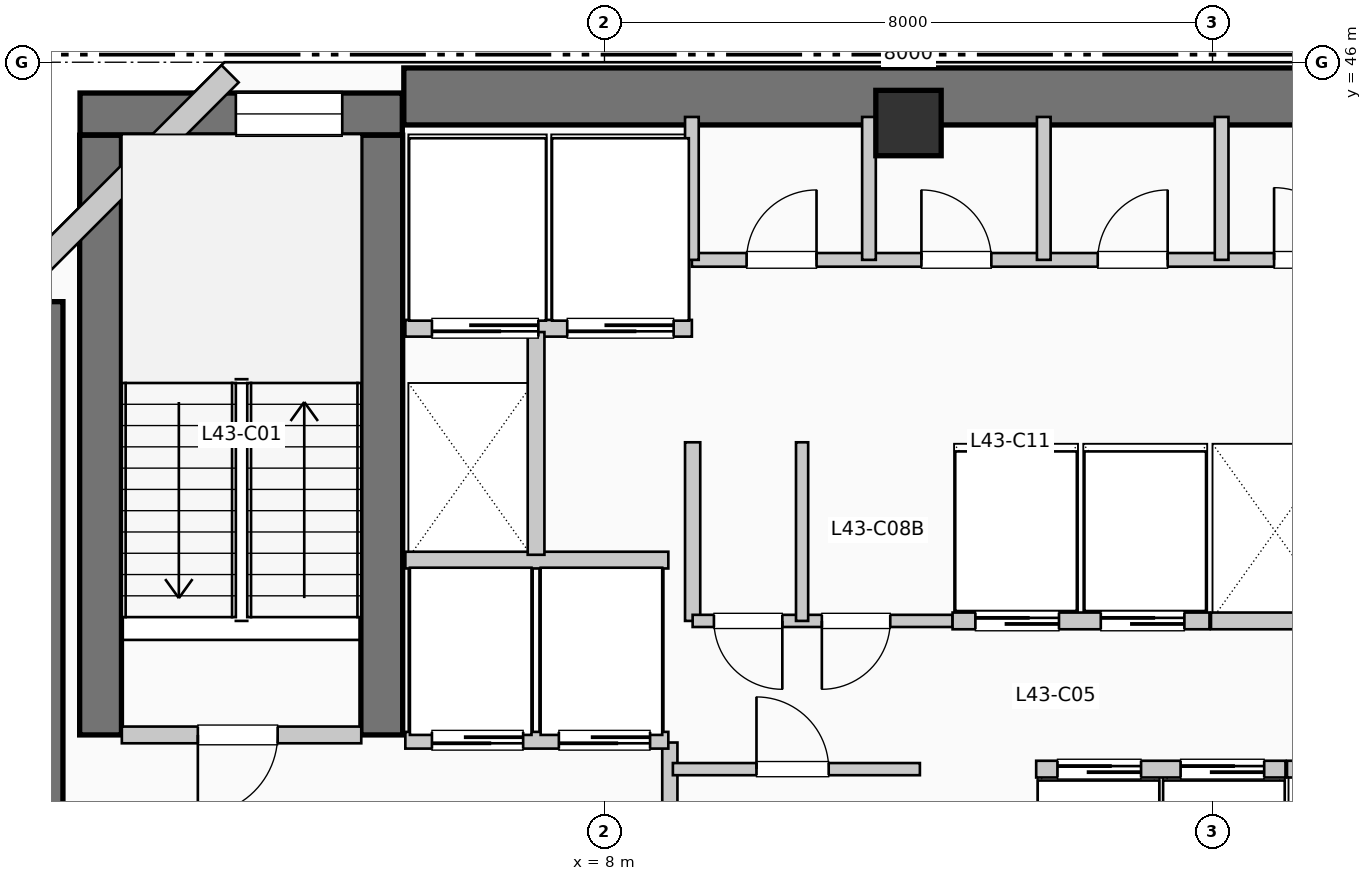
"""IFC4 building model, lengths in metres.
Left out: names, types, materials, properties, quantities, classifications, styles, units other than length and angle.
Written with IfcOpenShell. Run it as: python <this file> out.ifc"""

import sys

from ifc_helpers import new_model, si_unit, direction, frame, frame_2d, origin, origin_2d, place, context, subcontext, project, spatial, rectangle, extrude, element, fill, save


model = new_model("IFC4")
c1 = context("Model", 3, precision=1e-05, world=origin(), true_north=direction((0.0, 1.0)))
c2 = subcontext(c1, "Body", "Model", "MODEL_VIEW")
j1 = project(units=[si_unit("LENGTHUNIT", "METRE"), si_unit("PLANEANGLEUNIT", "RADIAN")], contexts=[c1])
p1 = place(None, origin())
s1 = spatial("IfcSite", under=j1, at=p1, CompositionType="ELEMENT")
p2 = place(p1, origin())
s2 = spatial("IfcBuilding", under=s1, at=p2, CompositionType="ELEMENT")
p3 = place(p2, frame((0.0, 0.0, 179.52)))
s3 = spatial("IfcBuildingStorey", under=s2, at=p3, CompositionType="ELEMENT", Elevation=179.52)
p4 = place(p3, frame((5.36, 45.55, 0.0), z_axis=(0.0, 0.0, 1.0), x_axis=(1.0, 0.0, 0.0)))
e1 = element("IfcWall", 1, at=p4, inside=s3, PredefinedType="SHEAR", context=c2, shape_type="SweptSolid", body=[
    extrude(rectangle(XDim=13.98, YDim=0.75, at=frame_2d((6.99, 0.0))), origin(), (0.0, 0.0, 1.0), 3.96),
])
p5 = place(p3, frame((0.5, 34.95, 0.0), z_axis=(0.0, 0.0, 1.0), x_axis=(0.0, 1.0, 0.0)))
e2 = element("IfcWall", 2, at=p5, inside=s3, PredefinedType="SHEAR", context=c2, shape_type="SweptSolid", body=[
    extrude(rectangle(XDim=7.9, YDim=0.75, at=frame_2d((3.95, 0.0))), origin(), (0.0, 0.0, 1.0), 3.96),
])
for number, where, z_axis, x_axis in (
    (3, (1.37, 37.15, 0.0), (0.0, 0.0, 1.0), (0.0, 1.0, 0.0)),
    (4, (5.07, 37.15, 0.0), (0.0, 0.0, 1.0), (0.0, 1.0, 0.0)),
):
    element("IfcWall", number, at=place(p3, frame(where, z_axis=z_axis, x_axis=x_axis)), inside=s3, PredefinedType="SHEAR", context=c2, shape_type="SweptSolid", body=[
        extrude(rectangle(XDim=7.89, YDim=0.55, at=frame_2d((3.945, 0.0))), origin(), (0.0, 0.0, 1.0), 3.96),
    ])
p6 = place(p3, frame((1.1, 45.32, 0.0), z_axis=(0.0, 0.0, 1.0), x_axis=(1.0, 0.0, 0.0)))
e5 = element("IfcWall", 5, at=p6, inside=s3, PredefinedType="SHEAR", context=c2, shape_type="SweptSolid", body=[
    extrude(rectangle(XDim=4.24, YDim=0.55, at=frame_2d((2.12, 0.0))), origin(), (0.0, 0.0, 1.0), 3.96),
])
p7 = place(p6, frame((2.05, 0.0, 1.05)))
e6 = element("IfcOpeningElement", 6, at=p7, cuts=e5, PredefinedType="OPENING", context=c2, shape_type="SweptSolid", body=[
    extrude(rectangle(XDim=1.4, YDim=1.8, at=frame_2d((0.7, 0.9))), frame((0.0, 0.285, 0.0), z_axis=(0.0, -1.0, 0.0), x_axis=(1.0, 0.0, 0.0)), (0.0, 0.0, 1.0), 0.57),
])
p8 = place(p3, frame((12.0, 45.2, 0.0), z_axis=(0.0, 0.0, 1.0), x_axis=(1.0, 0.0, 0.0)))
e7 = element("IfcColumn", 7, at=p8, inside=s3, PredefinedType="COLUMN", context=c2, shape_type="SweptSolid", body=[
    extrude(rectangle(XDim=0.86, YDim=0.86, at=origin_2d()), origin(), (0.0, 0.0, 1.0), 3.96),
])
p9 = place(p3, frame((3.074, 45.848, 0.0), z_axis=(0.0, 0.0, 1.0), x_axis=(-0.707106781187, -0.707106781187, 0.0)))
e8 = element("IfcWall", 8, at=p9, inside=s3, PredefinedType="SOLIDWALL", context=c2, shape_type="SweptSolid", body=[
    extrude(rectangle(XDim=4.133, YDim=0.32, at=frame_2d((2.066, 0.0))), origin(), (0.0, 0.0, 1.0), 3.71),
])
p10 = place(p3, frame((1.65, 37.15, 0.0), z_axis=(0.0, 0.0, 1.0), x_axis=(1.0, 0.0, 0.0)))
e9 = element("IfcWall", 9, at=p10, inside=s3, PredefinedType="PARTITIONING", context=c2, shape_type="SweptSolid", body=[
    extrude(rectangle(XDim=3.15, YDim=0.22, at=frame_2d((1.575, 0.0))), origin(), (0.0, 0.0, 1.0), 3.71),
])
p11 = place(p10, frame((2.05, 0.0, 0.0), z_axis=(0.0, 0.0, 1.0), x_axis=(-1.0, 0.0, 0.0)))
e10 = element("IfcOpeningElement", 10, at=p11, cuts=e9, PredefinedType="OPENING", context=c2, shape_type="SweptSolid", body=[
    extrude(rectangle(XDim=1.05, YDim=2.15, at=frame_2d((0.525, 1.075))), frame((0.0, 0.12, 0.0), z_axis=(0.0, -1.0, 0.0), x_axis=(1.0, 0.0, 0.0)), (0.0, 0.0, 1.0), 0.24),
])
p12 = place(p3, frame((8.86, 34.55, 0.0), z_axis=(0.0, 0.0, 1.0), x_axis=(0.0, 1.0, 0.0)))
e11 = element("IfcWall", 11, at=p12, inside=s3, PredefinedType="PARTITIONING", context=c2, shape_type="SweptSolid", body=[
    extrude(rectangle(XDim=2.5, YDim=0.2, at=frame_2d((1.25, 0.0))), origin(), (0.0, 0.0, 1.0), 3.71),
])
p13 = place(p3, frame((5.38, 37.08, 0.0), z_axis=(0.0, 0.0, 1.0), x_axis=(1.0, 0.0, 0.0)))
e12 = element("IfcWall", 12, at=p13, inside=s3, PredefinedType="PARTITIONING", context=c2, shape_type="SweptSolid", body=[
    extrude(rectangle(XDim=3.46, YDim=0.22, at=frame_2d((1.73, 0.0))), origin(), (0.0, 0.0, 1.0), 3.71),
])
p14 = place(p13, frame((1.55, 0.0, 0.0), z_axis=(0.0, 0.0, 1.0), x_axis=(-1.0, 0.0, 0.0)))
e13 = element("IfcOpeningElement", 13, at=p14, cuts=e12, PredefinedType="OPENING", context=c2, shape_type="SweptSolid", body=[
    extrude(rectangle(XDim=1.2, YDim=2.2, at=frame_2d((0.6, 1.1))), frame((0.0, 0.12, 0.0), z_axis=(0.0, -1.0, 0.0), x_axis=(1.0, 0.0, 0.0)), (0.0, 0.0, 1.0), 0.24),
])
p15 = place(p13, frame((3.22, 0.0, 0.0), z_axis=(0.0, 0.0, 1.0), x_axis=(-1.0, 0.0, 0.0)))
e14 = element("IfcOpeningElement", 14, at=p15, cuts=e12, PredefinedType="OPENING", context=c2, shape_type="SweptSolid", body=[
    extrude(rectangle(XDim=1.2, YDim=2.2, at=frame_2d((0.6, 1.1))), frame((0.0, 0.12, 0.0), z_axis=(0.0, -1.0, 0.0), x_axis=(1.0, 0.0, 0.0)), (0.0, 0.0, 1.0), 0.24),
])
p16 = place(p3, frame((5.38, 39.45, 0.0), z_axis=(0.0, 0.0, 1.0), x_axis=(1.0, 0.0, 0.0)))
e15 = element("IfcWall", 15, at=p16, inside=s3, PredefinedType="PARTITIONING", context=c2, shape_type="SweptSolid", body=[
    extrude(rectangle(XDim=3.46, YDim=0.22, at=frame_2d((1.73, 0.0))), origin(), (0.0, 0.0, 1.0), 3.71),
])
p17 = place(p3, frame((5.38, 42.5, 0.0), z_axis=(0.0, 0.0, 1.0), x_axis=(1.0, 0.0, 0.0)))
e16 = element("IfcWall", 16, at=p17, inside=s3, PredefinedType="PARTITIONING", context=c2, shape_type="SweptSolid", body=[
    extrude(rectangle(XDim=3.77, YDim=0.22, at=frame_2d((1.885, 0.0))), origin(), (0.0, 0.0, 1.0), 3.71),
])
p18 = place(p17, frame((1.75, 0.0, 0.0), z_axis=(0.0, 0.0, 1.0), x_axis=(-1.0, 0.0, 0.0)))
e17 = element("IfcOpeningElement", 17, at=p18, cuts=e16, PredefinedType="OPENING", context=c2, shape_type="SweptSolid", body=[
    extrude(rectangle(XDim=1.4, YDim=2.2, at=frame_2d((0.7, 1.1))), frame((0.0, 0.12, 0.0), z_axis=(0.0, -1.0, 0.0), x_axis=(1.0, 0.0, 0.0)), (0.0, 0.0, 1.0), 0.24),
])
p19 = place(p17, frame((3.53, 0.0, 0.0), z_axis=(0.0, 0.0, 1.0), x_axis=(-1.0, 0.0, 0.0)))
e18 = element("IfcOpeningElement", 18, at=p19, cuts=e16, PredefinedType="OPENING", context=c2, shape_type="SweptSolid", body=[
    extrude(rectangle(XDim=1.4, YDim=2.2, at=frame_2d((0.7, 1.1))), frame((0.0, 0.12, 0.0), z_axis=(0.0, -1.0, 0.0), x_axis=(1.0, 0.0, 0.0)), (0.0, 0.0, 1.0), 0.24),
])
p20 = place(p3, frame((7.1, 39.52, 0.0), z_axis=(0.0, 0.0, 1.0), x_axis=(0.0, 1.0, 0.0)))
e19 = element("IfcWall", 19, at=p20, inside=s3, PredefinedType="PARTITIONING", context=c2, shape_type="SweptSolid", body=[
    extrude(rectangle(XDim=2.93, YDim=0.22, at=frame_2d((1.465, 0.0))), origin(), (0.0, 0.0, 1.0), 3.71),
])
p21 = place(p3, frame((9.16, 38.65, 0.0), z_axis=(0.0, 0.0, 1.0), x_axis=(0.0, 1.0, 0.0)))
e20 = element("IfcWall", 20, at=p21, inside=s3, PredefinedType="PARTITIONING", context=c2, shape_type="SweptSolid", body=[
    extrude(rectangle(XDim=2.35, YDim=0.2, at=frame_2d((1.175, 0.0))), origin(), (0.0, 0.0, 1.0), 3.71),
])
p22 = place(p3, frame((8.9, 36.7, 0.0), z_axis=(0.0, 0.0, 1.0), x_axis=(1.0, 0.0, 0.0)))
e21 = element("IfcWall", 21, at=p22, inside=s3, PredefinedType="PARTITIONING", context=c2, shape_type="SweptSolid", body=[
    extrude(rectangle(XDim=3.25, YDim=0.16, at=frame_2d((1.625, 0.0))), origin(), (0.0, 0.0, 1.0), 3.71),
])
p23 = place(p22, frame((1.1, 0.0, 0.0)))
e22 = element("IfcOpeningElement", 22, at=p23, cuts=e21, PredefinedType="OPENING", context=c2, shape_type="SweptSolid", body=[
    extrude(rectangle(XDim=0.95, YDim=2.15, at=frame_2d((0.475, 1.075))), frame((0.0, 0.09, 0.0), z_axis=(0.0, -1.0, 0.0), x_axis=(1.0, 0.0, 0.0)), (0.0, 0.0, 1.0), 0.18),
])
p24 = place(p3, frame((9.16, 38.65, 0.0), z_axis=(0.0, 0.0, 1.0), x_axis=(1.0, 0.0, 0.0)))
e23 = element("IfcWall", 23, at=p24, inside=s3, PredefinedType="PARTITIONING", context=c2, shape_type="SweptSolid", body=[
    extrude(rectangle(XDim=3.42, YDim=0.16, at=frame_2d((1.71, 0.0))), origin(), (0.0, 0.0, 1.0), 3.71),
])
p25 = place(p24, frame((1.18, 0.0, 0.0), z_axis=(0.0, 0.0, 1.0), x_axis=(-1.0, 0.0, 0.0)))
e24 = element("IfcOpeningElement", 24, at=p25, cuts=e23, PredefinedType="OPENING", context=c2, shape_type="SweptSolid", body=[
    extrude(rectangle(XDim=0.9, YDim=2.15, at=frame_2d((0.45, 1.075))), frame((0.0, 0.09, 0.0), z_axis=(0.0, -1.0, 0.0), x_axis=(1.0, 0.0, 0.0)), (0.0, 0.0, 1.0), 0.18),
])
p26 = place(p24, frame((2.6, 0.0, 0.0), z_axis=(0.0, 0.0, 1.0), x_axis=(-1.0, 0.0, 0.0)))
e25 = element("IfcOpeningElement", 25, at=p26, cuts=e23, PredefinedType="OPENING", context=c2, shape_type="SweptSolid", body=[
    extrude(rectangle(XDim=0.9, YDim=2.15, at=frame_2d((0.45, 1.075))), frame((0.0, 0.09, 0.0), z_axis=(0.0, -1.0, 0.0), x_axis=(1.0, 0.0, 0.0)), (0.0, 0.0, 1.0), 0.18),
])
p27 = place(p3, frame((10.6, 38.65, 0.0), z_axis=(0.0, 0.0, 1.0), x_axis=(0.0, 1.0, 0.0)))
e26 = element("IfcWall", 26, at=p27, inside=s3, PredefinedType="PARTITIONING", context=c2, shape_type="SweptSolid", body=[
    extrude(rectangle(XDim=2.35, YDim=0.16, at=frame_2d((1.175, 0.0))), origin(), (0.0, 0.0, 1.0), 3.71),
])
p28 = place(p3, frame((13.68, 36.7, 0.0), z_axis=(0.0, 0.0, 1.0), x_axis=(1.0, 0.0, 0.0)))
e27 = element("IfcWall", 27, at=p28, inside=s3, PredefinedType="PARTITIONING", context=c2, shape_type="SweptSolid", body=[
    extrude(rectangle(XDim=3.28, YDim=0.22, at=frame_2d((1.64, 0.0))), origin(), (0.0, 0.0, 1.0), 3.71),
])
p29 = place(p28, frame((0.28, 0.0, 0.0)))
e28 = element("IfcOpeningElement", 28, at=p29, cuts=e27, PredefinedType="OPENING", context=c2, shape_type="SweptSolid", body=[
    extrude(rectangle(XDim=1.1, YDim=2.2, at=frame_2d((0.55, 1.1))), frame((0.0, 0.12, 0.0), z_axis=(0.0, -1.0, 0.0), x_axis=(1.0, 0.0, 0.0)), (0.0, 0.0, 1.0), 0.24),
])
p30 = place(p28, frame((1.9, 0.0, 0.0)))
e29 = element("IfcOpeningElement", 29, at=p30, cuts=e27, PredefinedType="OPENING", context=c2, shape_type="SweptSolid", body=[
    extrude(rectangle(XDim=1.1, YDim=2.2, at=frame_2d((0.55, 1.1))), frame((0.0, 0.12, 0.0), z_axis=(0.0, -1.0, 0.0), x_axis=(1.0, 0.0, 0.0)), (0.0, 0.0, 1.0), 0.24),
])
p31 = place(p3, frame((12.58, 38.65, 0.0), z_axis=(0.0, 0.0, 1.0), x_axis=(1.0, 0.0, 0.0)))
e30 = element("IfcWall", 30, at=p31, inside=s3, PredefinedType="PARTITIONING", context=c2, shape_type="SweptSolid", body=[
    extrude(rectangle(XDim=3.38, YDim=0.22, at=frame_2d((1.69, 0.0))), origin(), (0.0, 0.0, 1.0), 3.71),
])
p32 = place(p31, frame((0.3, 0.0, 0.0)))
e31 = element("IfcOpeningElement", 31, at=p32, cuts=e30, PredefinedType="OPENING", context=c2, shape_type="SweptSolid", body=[
    extrude(rectangle(XDim=1.1, YDim=2.2, at=frame_2d((0.55, 1.1))), frame((0.0, 0.12, 0.0), z_axis=(0.0, -1.0, 0.0), x_axis=(1.0, 0.0, 0.0)), (0.0, 0.0, 1.0), 0.24),
])
p33 = place(p31, frame((1.95, 0.0, 0.0)))
e32 = element("IfcOpeningElement", 32, at=p33, cuts=e30, PredefinedType="OPENING", context=c2, shape_type="SweptSolid", body=[
    extrude(rectangle(XDim=1.1, YDim=2.2, at=frame_2d((0.55, 1.1))), frame((0.0, 0.12, 0.0), z_axis=(0.0, -1.0, 0.0), x_axis=(1.0, 0.0, 0.0)), (0.0, 0.0, 1.0), 0.24),
])
p34 = place(p3, frame((16.98, 36.7, 0.0), z_axis=(0.0, 0.0, 1.0), x_axis=(1.0, 0.0, 0.0)))
e33 = element("IfcWall", 33, at=p34, inside=s3, PredefinedType="PARTITIONING", context=c2, shape_type="SweptSolid", body=[
    extrude(rectangle(XDim=1.7, YDim=0.22, at=frame_2d((0.85, 0.0))), origin(), (0.0, 0.0, 1.0), 3.71),
])
p35 = place(p3, frame((15.98, 38.65, 0.0), z_axis=(0.0, 0.0, 1.0), x_axis=(1.0, 0.0, 0.0)))
e34 = element("IfcWall", 34, at=p35, inside=s3, PredefinedType="PARTITIONING", context=c2, shape_type="SweptSolid", body=[
    extrude(rectangle(XDim=1.72, YDim=0.22, at=frame_2d((0.86, 0.0))), origin(), (0.0, 0.0, 1.0), 3.71),
])
p36 = place(p3, frame((9.15, 43.4, 0.0), z_axis=(0.0, 0.0, 1.0), x_axis=(1.0, 0.0, 0.0)))
e35 = element("IfcWall", 35, at=p36, inside=s3, PredefinedType="PLUMBINGWALL", context=c2, shape_type="SweptSolid", body=[
    extrude(rectangle(XDim=9.33, YDim=0.18, at=frame_2d((4.665, 0.0))), origin(), (0.0, 0.0, 1.0), 3.71),
])
p37 = place(p36, frame((0.72, 0.0, 0.0)))
e36 = element("IfcOpeningElement", 36, at=p37, cuts=e35, PredefinedType="OPENING", context=c2, shape_type="SweptSolid", body=[
    extrude(rectangle(XDim=0.92, YDim=2.1, at=frame_2d((0.46, 1.05))), frame((0.0, 0.1, 0.0), z_axis=(0.0, -1.0, 0.0), x_axis=(1.0, 0.0, 0.0)), (0.0, 0.0, 1.0), 0.2),
])
p38 = place(p36, frame((3.02, 0.0, 0.0)))
e37 = element("IfcOpeningElement", 37, at=p38, cuts=e35, PredefinedType="OPENING", context=c2, shape_type="SweptSolid", body=[
    extrude(rectangle(XDim=0.92, YDim=2.1, at=frame_2d((0.46, 1.05))), frame((0.0, 0.1, 0.0), z_axis=(0.0, -1.0, 0.0), x_axis=(1.0, 0.0, 0.0)), (0.0, 0.0, 1.0), 0.2),
])
p39 = place(p36, frame((5.34, 0.0, 0.0)))
e38 = element("IfcOpeningElement", 38, at=p39, cuts=e35, PredefinedType="OPENING", context=c2, shape_type="SweptSolid", body=[
    extrude(rectangle(XDim=0.92, YDim=2.1, at=frame_2d((0.46, 1.05))), frame((0.0, 0.1, 0.0), z_axis=(0.0, -1.0, 0.0), x_axis=(1.0, 0.0, 0.0)), (0.0, 0.0, 1.0), 0.2),
])
p40 = place(p36, frame((7.66, 0.0, 0.0)))
e39 = element("IfcOpeningElement", 39, at=p40, cuts=e35, PredefinedType="OPENING", context=c2, shape_type="SweptSolid", body=[
    extrude(rectangle(XDim=0.95, YDim=2.1, at=frame_2d((0.475, 1.05))), frame((0.0, 0.1, 0.0), z_axis=(0.0, -1.0, 0.0), x_axis=(1.0, 0.0, 0.0)), (0.0, 0.0, 1.0), 0.2),
])
for number, where, z_axis, x_axis in (
    (40, (9.15, 43.4, 0.0), (0.0, 0.0, 1.0), (0.0, 1.0, 0.0)),
    (41, (11.48, 43.4, 0.0), (0.0, 0.0, 1.0), (0.0, 1.0, 0.0)),
    (42, (13.78, 43.4, 0.0), (0.0, 0.0, 1.0), (0.0, 1.0, 0.0)),
    (43, (16.12, 43.4, 0.0), (0.0, 0.0, 1.0), (0.0, 1.0, 0.0)),
):
    element("IfcWall", number, at=place(p3, frame(where, z_axis=z_axis, x_axis=x_axis)), inside=s3, PredefinedType="PLUMBINGWALL", context=c2, shape_type="SweptSolid", body=[
        extrude(rectangle(XDim=1.88, YDim=0.18, at=frame_2d((0.94, 0.0))), origin(), (0.0, 0.0, 1.0), 3.71),
    ])
p41 = place(p7, origin())
e44 = element("IfcWindow", 44, at=p41, inside=s3, PartitioningType="SINGLE_PANEL", PredefinedType="WINDOW", context=c2, shape_type="SweptSolid", body=[
    extrude(rectangle(XDim=1.4, YDim=1.8, at=frame_2d((0.7, 0.9))), frame((0.0, 0.03, 0.0), z_axis=(0.0, -1.0, 0.0), x_axis=(1.0, 0.0, 0.0)), (0.0, 0.0, 1.0), 0.06),
])
fill(e6, e44)
p42 = place(p11, origin())
e45 = element("IfcDoor", 45, at=p42, inside=s3, OperationType="SINGLE_SWING_LEFT", PredefinedType="DOOR", context=c2, shape_type="SweptSolid", body=[
    extrude(rectangle(XDim=1.05, YDim=2.15, at=frame_2d((0.525, 1.075))), frame((0.0, 0.025, 0.0), z_axis=(0.0, -1.0, 0.0), x_axis=(1.0, 0.0, 0.0)), (0.0, 0.0, 1.0), 0.05),
])
fill(e10, e45)
p43 = place(p14, origin())
e46 = element("IfcDoor", 46, at=p43, inside=s3, OperationType="SLIDING_TO_RIGHT", PredefinedType="DOOR", context=c2, shape_type="SweptSolid", body=[
    extrude(rectangle(XDim=1.2, YDim=2.2, at=frame_2d((0.6, 1.1))), frame((0.0, 0.025, 0.0), z_axis=(0.0, -1.0, 0.0), x_axis=(1.0, 0.0, 0.0)), (0.0, 0.0, 1.0), 0.05),
])
fill(e13, e46)
p44 = place(p15, origin())
e47 = element("IfcDoor", 47, at=p44, inside=s3, OperationType="SLIDING_TO_RIGHT", PredefinedType="DOOR", context=c2, shape_type="SweptSolid", body=[
    extrude(rectangle(XDim=1.2, YDim=2.2, at=frame_2d((0.6, 1.1))), frame((0.0, 0.025, 0.0), z_axis=(0.0, -1.0, 0.0), x_axis=(1.0, 0.0, 0.0)), (0.0, 0.0, 1.0), 0.05),
])
fill(e14, e47)
p45 = place(p18, origin())
e48 = element("IfcDoor", 48, at=p45, inside=s3, OperationType="SLIDING_TO_LEFT", PredefinedType="DOOR", context=c2, shape_type="SweptSolid", body=[
    extrude(rectangle(XDim=1.4, YDim=2.2, at=frame_2d((0.7, 1.1))), frame((0.0, 0.025, 0.0), z_axis=(0.0, -1.0, 0.0), x_axis=(1.0, 0.0, 0.0)), (0.0, 0.0, 1.0), 0.05),
])
fill(e17, e48)
p46 = place(p19, origin())
e49 = element("IfcDoor", 49, at=p46, inside=s3, OperationType="SLIDING_TO_LEFT", PredefinedType="DOOR", context=c2, shape_type="SweptSolid", body=[
    extrude(rectangle(XDim=1.4, YDim=2.2, at=frame_2d((0.7, 1.1))), frame((0.0, 0.025, 0.0), z_axis=(0.0, -1.0, 0.0), x_axis=(1.0, 0.0, 0.0)), (0.0, 0.0, 1.0), 0.05),
])
fill(e18, e49)
p47 = place(p23, origin())
e50 = element("IfcDoor", 50, at=p47, inside=s3, OperationType="SINGLE_SWING_LEFT", PredefinedType="DOOR", context=c2, shape_type="SweptSolid", body=[
    extrude(rectangle(XDim=0.95, YDim=2.15, at=frame_2d((0.475, 1.075))), frame((0.0, 0.025, 0.0), z_axis=(0.0, -1.0, 0.0), x_axis=(1.0, 0.0, 0.0)), (0.0, 0.0, 1.0), 0.05),
])
fill(e22, e50)
p48 = place(p25, origin())
e51 = element("IfcDoor", 51, at=p48, inside=s3, OperationType="SINGLE_SWING_RIGHT", PredefinedType="DOOR", context=c2, shape_type="SweptSolid", body=[
    extrude(rectangle(XDim=0.9, YDim=2.15, at=frame_2d((0.45, 1.075))), frame((0.0, 0.025, 0.0), z_axis=(0.0, -1.0, 0.0), x_axis=(1.0, 0.0, 0.0)), (0.0, 0.0, 1.0), 0.05),
])
fill(e24, e51)
p49 = place(p26, origin())
e52 = element("IfcDoor", 52, at=p49, inside=s3, OperationType="SINGLE_SWING_LEFT", PredefinedType="DOOR", context=c2, shape_type="SweptSolid", body=[
    extrude(rectangle(XDim=0.9, YDim=2.15, at=frame_2d((0.45, 1.075))), frame((0.0, 0.025, 0.0), z_axis=(0.0, -1.0, 0.0), x_axis=(1.0, 0.0, 0.0)), (0.0, 0.0, 1.0), 0.05),
])
fill(e25, e52)
p50 = place(p29, origin())
e53 = element("IfcDoor", 53, at=p50, inside=s3, OperationType="SLIDING_TO_RIGHT", PredefinedType="DOOR", context=c2, shape_type="SweptSolid", body=[
    extrude(rectangle(XDim=1.1, YDim=2.2, at=frame_2d((0.55, 1.1))), frame((0.0, 0.025, 0.0), z_axis=(0.0, -1.0, 0.0), x_axis=(1.0, 0.0, 0.0)), (0.0, 0.0, 1.0), 0.05),
])
fill(e28, e53)
p51 = place(p30, origin())
e54 = element("IfcDoor", 54, at=p51, inside=s3, OperationType="SLIDING_TO_RIGHT", PredefinedType="DOOR", context=c2, shape_type="SweptSolid", body=[
    extrude(rectangle(XDim=1.1, YDim=2.2, at=frame_2d((0.55, 1.1))), frame((0.0, 0.025, 0.0), z_axis=(0.0, -1.0, 0.0), x_axis=(1.0, 0.0, 0.0)), (0.0, 0.0, 1.0), 0.05),
])
fill(e29, e54)
p52 = place(p32, origin())
e55 = element("IfcDoor", 55, at=p52, inside=s3, OperationType="SLIDING_TO_RIGHT", PredefinedType="DOOR", context=c2, shape_type="SweptSolid", body=[
    extrude(rectangle(XDim=1.1, YDim=2.2, at=frame_2d((0.55, 1.1))), frame((0.0, 0.025, 0.0), z_axis=(0.0, -1.0, 0.0), x_axis=(1.0, 0.0, 0.0)), (0.0, 0.0, 1.0), 0.05),
])
fill(e31, e55)
p53 = place(p33, origin())
e56 = element("IfcDoor", 56, at=p53, inside=s3, OperationType="SLIDING_TO_RIGHT", PredefinedType="DOOR", context=c2, shape_type="SweptSolid", body=[
    extrude(rectangle(XDim=1.1, YDim=2.2, at=frame_2d((0.55, 1.1))), frame((0.0, 0.025, 0.0), z_axis=(0.0, -1.0, 0.0), x_axis=(1.0, 0.0, 0.0)), (0.0, 0.0, 1.0), 0.05),
])
fill(e32, e56)
p54 = place(p37, origin())
e57 = element("IfcDoor", 57, at=p54, inside=s3, OperationType="SINGLE_SWING_RIGHT", PredefinedType="DOOR", context=c2, shape_type="SweptSolid", body=[
    extrude(rectangle(XDim=0.92, YDim=2.1, at=frame_2d((0.46, 1.05))), frame((0.0, 0.025, 0.0), z_axis=(0.0, -1.0, 0.0), x_axis=(1.0, 0.0, 0.0)), (0.0, 0.0, 1.0), 0.05),
])
fill(e36, e57)
p55 = place(p38, origin())
e58 = element("IfcDoor", 58, at=p55, inside=s3, OperationType="SINGLE_SWING_LEFT", PredefinedType="DOOR", context=c2, shape_type="SweptSolid", body=[
    extrude(rectangle(XDim=0.92, YDim=2.1, at=frame_2d((0.46, 1.05))), frame((0.0, 0.025, 0.0), z_axis=(0.0, -1.0, 0.0), x_axis=(1.0, 0.0, 0.0)), (0.0, 0.0, 1.0), 0.05),
])
fill(e37, e58)
p56 = place(p39, origin())
e59 = element("IfcDoor", 59, at=p56, inside=s3, OperationType="SINGLE_SWING_RIGHT", PredefinedType="DOOR", context=c2, shape_type="SweptSolid", body=[
    extrude(rectangle(XDim=0.92, YDim=2.1, at=frame_2d((0.46, 1.05))), frame((0.0, 0.025, 0.0), z_axis=(0.0, -1.0, 0.0), x_axis=(1.0, 0.0, 0.0)), (0.0, 0.0, 1.0), 0.05),
])
fill(e38, e59)
p57 = place(p40, origin())
e60 = element("IfcDoor", 60, at=p57, inside=s3, OperationType="SINGLE_SWING_LEFT", PredefinedType="DOOR", context=c2, shape_type="SweptSolid", body=[
    extrude(rectangle(XDim=0.95, YDim=2.1, at=frame_2d((0.475, 1.05))), frame((0.0, 0.025, 0.0), z_axis=(0.0, -1.0, 0.0), x_axis=(1.0, 0.0, 0.0)), (0.0, 0.0, 1.0), 0.05),
])
fill(e39, e60)
save(model, sys.argv[1])
